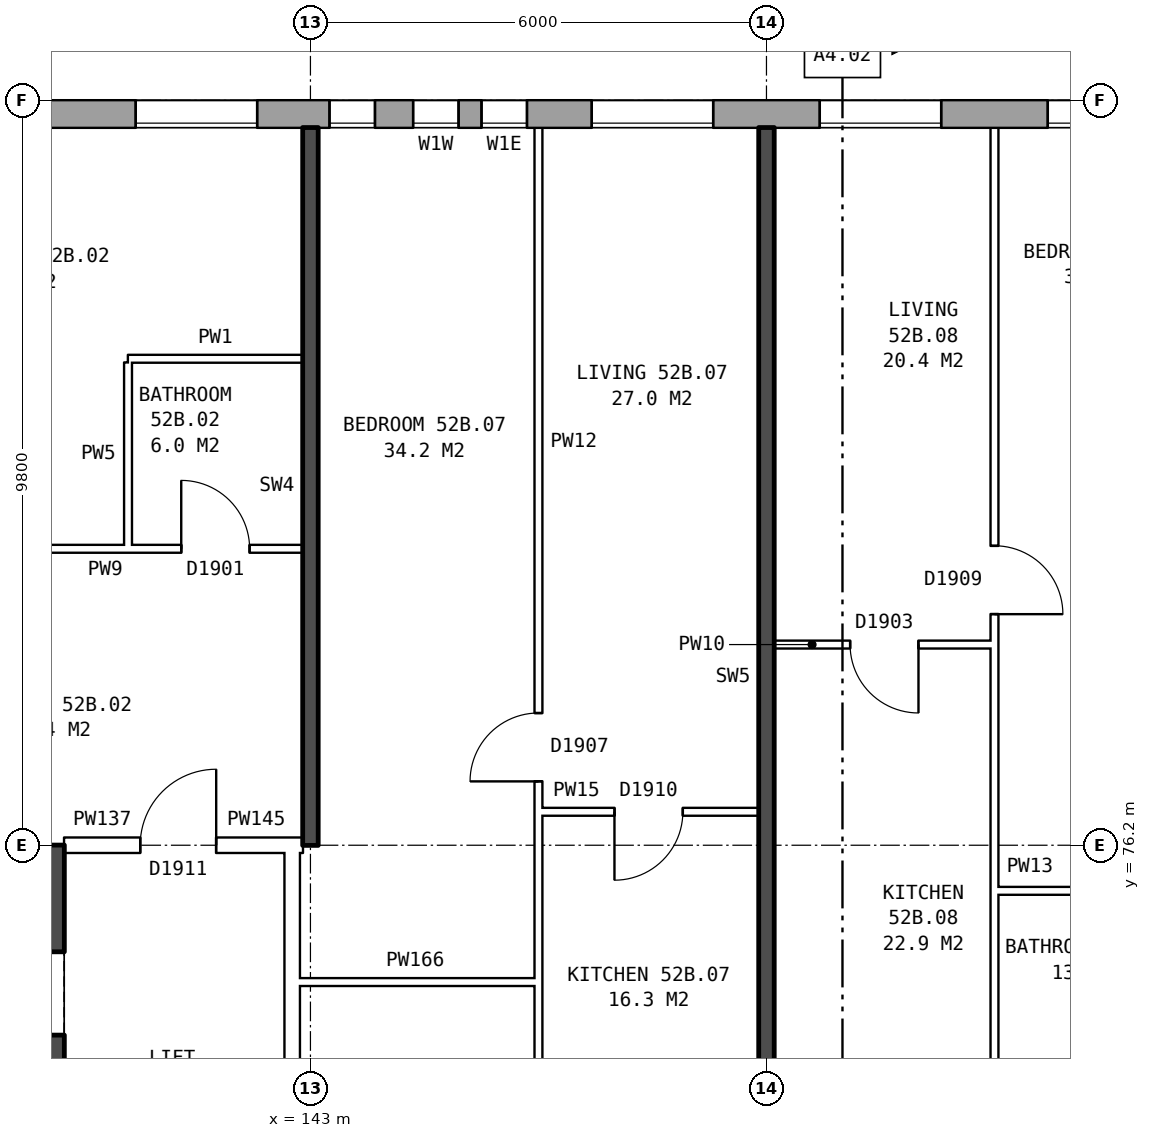
"""IFC4 building model, lengths in metres.
Left out: names, types, materials, properties, quantities, classifications, styles, units other than length and angle.
Written with IfcOpenShell. Run it as: python <this file> out.ifc"""

import sys

from ifc_helpers import new_model, si_unit, direction, frame, frame_2d, origin, place, context, subcontext, project, spatial, rectangle, extrude, element, fill, save


model = new_model("IFC4")
c1 = context("Model", 3, precision=1e-05, world=origin(), true_north=direction((0.0, 1.0)))
c2 = subcontext(c1, "Body", "Model", "MODEL_VIEW")
j1 = project(units=[si_unit("LENGTHUNIT", "METRE"), si_unit("PLANEANGLEUNIT", "RADIAN")], contexts=[c1])
p1 = place(None, origin())
s1 = spatial("IfcSite", under=j1, at=p1, CompositionType="ELEMENT")
p2 = place(p1, origin())
s2 = spatial("IfcBuilding", under=s1, at=p2, CompositionType="ELEMENT")
p3 = place(p2, frame((0.0, 0.0, 185.1)))
s3 = spatial("IfcBuildingStorey", under=s2, at=p3, CompositionType="ELEMENT", Elevation=185.1)
p4 = place(p3, frame((167.175, 85.82, 0.0), z_axis=(0.0, 0.0, 1.0), x_axis=(-1.0, 0.0, 0.0)))
e1 = element("IfcWall", 1, at=p4, inside=s3, PredefinedType="STANDARD", context=c2, shape_type="SweptSolid", body=[
    extrude(rectangle(XDim=33.101, YDim=0.36, at=frame_2d((16.55, 0.0))), origin(), (0.0, 0.0, 1.0), 2.85),
])
p5 = place(p4, frame((0.875, 0.0, 0.8)))
e2 = element("IfcOpeningElement", 2, at=p5, cuts=e1, PredefinedType="OPENING", context=c2, shape_type="SweptSolid", body=[
    extrude(rectangle(XDim=1.6, YDim=1.8, at=frame_2d((0.8, 0.9))), frame((0.0, 0.19, 0.0), z_axis=(0.0, -1.0, 0.0), x_axis=(1.0, 0.0, 0.0)), (0.0, 0.0, 1.0), 0.38),
])
p6 = place(p4, frame((3.875, 0.0, 0.8)))
e3 = element("IfcOpeningElement", 3, at=p6, cuts=e1, PredefinedType="OPENING", context=c2, shape_type="SweptSolid", body=[
    extrude(rectangle(XDim=1.6, YDim=1.8, at=frame_2d((0.8, 0.9))), frame((0.0, 0.19, 0.0), z_axis=(0.0, -1.0, 0.0), x_axis=(1.0, 0.0, 0.0)), (0.0, 0.0, 1.0), 0.38),
])
p7 = place(p4, frame((6.875, 0.0, 0.8)))
e4 = element("IfcOpeningElement", 4, at=p7, cuts=e1, PredefinedType="OPENING", context=c2, shape_type="SweptSolid", body=[
    extrude(rectangle(XDim=1.6, YDim=1.8, at=frame_2d((0.8, 0.9))), frame((0.0, 0.19, 0.0), z_axis=(0.0, -1.0, 0.0), x_axis=(1.0, 0.0, 0.0)), (0.0, 0.0, 1.0), 0.38),
])
p8 = place(p4, frame((8.775, 0.0, 1.4)))
e5 = element("IfcOpeningElement", 5, at=p8, cuts=e1, PredefinedType="OPENING", context=c2, shape_type="SweptSolid", body=[
    extrude(rectangle(XDim=0.8, YDim=1.2, at=frame_2d((0.4, 0.6))), frame((0.0, 0.19, 0.0), z_axis=(0.0, -1.0, 0.0), x_axis=(1.0, 0.0, 0.0)), (0.0, 0.0, 1.0), 0.38),
])
p9 = place(p4, frame((12.875, 0.0, 0.8)))
e6 = element("IfcOpeningElement", 6, at=p9, cuts=e1, PredefinedType="OPENING", context=c2, shape_type="SweptSolid", body=[
    extrude(rectangle(XDim=1.6, YDim=1.8, at=frame_2d((0.8, 0.9))), frame((0.0, 0.19, 0.0), z_axis=(0.0, -1.0, 0.0), x_axis=(1.0, 0.0, 0.0)), (0.0, 0.0, 1.0), 0.38),
])
p10 = place(p4, frame((15.875, 0.0, 0.8)))
e7 = element("IfcOpeningElement", 7, at=p10, cuts=e1, PredefinedType="OPENING", context=c2, shape_type="SweptSolid", body=[
    extrude(rectangle(XDim=1.6, YDim=1.8, at=frame_2d((0.8, 0.9))), frame((0.0, 0.19, 0.0), z_axis=(0.0, -1.0, 0.0), x_axis=(1.0, 0.0, 0.0)), (0.0, 0.0, 1.0), 0.38),
])
p11 = place(p4, frame((18.875, 0.0, 0.8)))
e8 = element("IfcOpeningElement", 8, at=p11, cuts=e1, PredefinedType="OPENING", context=c2, shape_type="SweptSolid", body=[
    extrude(rectangle(XDim=1.6, YDim=1.8, at=frame_2d((0.8, 0.9))), frame((0.0, 0.19, 0.0), z_axis=(0.0, -1.0, 0.0), x_axis=(1.0, 0.0, 0.0)), (0.0, 0.0, 1.0), 0.38),
])
p12 = place(p4, frame((21.325, 0.0, 0.25)))
e9 = element("IfcOpeningElement", 9, at=p12, cuts=e1, PredefinedType="OPENING", context=c2, shape_type="SweptSolid", body=[
    extrude(rectangle(XDim=0.6, YDim=1.8, at=frame_2d((0.3, 0.9))), frame((0.0, 0.19, 0.0), z_axis=(0.0, -1.0, 0.0), x_axis=(1.0, 0.0, 0.0)), (0.0, 0.0, 1.0), 0.38),
])
p13 = place(p4, frame((24.875, 0.0, 0.8)))
e10 = element("IfcOpeningElement", 10, at=p13, cuts=e1, PredefinedType="OPENING", context=c2, shape_type="SweptSolid", body=[
    extrude(rectangle(XDim=1.6, YDim=1.8, at=frame_2d((0.8, 0.9))), frame((0.0, 0.19, 0.0), z_axis=(0.0, -1.0, 0.0), x_axis=(1.0, 0.0, 0.0)), (0.0, 0.0, 1.0), 0.38),
])
p14 = place(p4, frame((27.875, 0.0, 0.8)))
e11 = element("IfcOpeningElement", 11, at=p14, cuts=e1, PredefinedType="OPENING", context=c2, shape_type="SweptSolid", body=[
    extrude(rectangle(XDim=1.6, YDim=1.8, at=frame_2d((0.8, 0.9))), frame((0.0, 0.19, 0.0), z_axis=(0.0, -1.0, 0.0), x_axis=(1.0, 0.0, 0.0)), (0.0, 0.0, 1.0), 0.38),
])
p15 = place(p4, frame((30.875, 0.0, 0.8)))
e12 = element("IfcOpeningElement", 12, at=p15, cuts=e1, PredefinedType="OPENING", context=c2, shape_type="SweptSolid", body=[
    extrude(rectangle(XDim=1.6, YDim=1.8, at=frame_2d((0.8, 0.9))), frame((0.0, 0.19, 0.0), z_axis=(0.0, -1.0, 0.0), x_axis=(1.0, 0.0, 0.0)), (0.0, 0.0, 1.0), 0.38),
])
p16 = place(p4, frame((11.125, 0.0, 0.8)))
e13 = element("IfcOpeningElement", 13, at=p16, cuts=e1, PredefinedType="OPENING", context=c2, shape_type="SweptSolid", body=[
    extrude(rectangle(XDim=0.8, YDim=1.2, at=frame_2d((0.4, 0.6))), frame((0.0, 0.19, 0.0), z_axis=(0.0, -1.0, 0.0), x_axis=(1.0, 0.0, 0.0)), (0.0, 0.0, 1.0), 0.38),
])
p17 = place(p4, frame((22.225, 0.0, 0.15)))
e14 = element("IfcOpeningElement", 14, at=p17, cuts=e1, PredefinedType="OPENING", context=c2, shape_type="SweptSolid", body=[
    extrude(rectangle(XDim=0.6, YDim=0.9, at=frame_2d((0.3, 0.45))), frame((0.0, 0.19, 0.0), z_axis=(0.0, -1.0, 0.0), x_axis=(1.0, 0.0, 0.0)), (0.0, 0.0, 1.0), 0.38),
])
p18 = place(p4, frame((23.325, 0.0, 1.65)))
e15 = element("IfcOpeningElement", 15, at=p18, cuts=e1, PredefinedType="OPENING", context=c2, shape_type="SweptSolid", body=[
    extrude(rectangle(XDim=0.6, YDim=0.9, at=frame_2d((0.3, 0.45))), frame((0.0, 0.19, 0.0), z_axis=(0.0, -1.0, 0.0), x_axis=(1.0, 0.0, 0.0)), (0.0, 0.0, 1.0), 0.38),
])
p19 = place(p3, frame((139.535, 63.8, 0.0), z_axis=(0.0, 0.0, 1.0), x_axis=(0.0, 1.0, 0.0)))
e16 = element("IfcWall", 16, at=p19, inside=s3, PredefinedType="SHEAR", context=c2, shape_type="SweptSolid", body=[
    extrude(rectangle(XDim=12.4, YDim=0.45, at=frame_2d((6.2, 0.0))), origin(), (0.0, 0.0, 1.0), 2.85),
])
p20 = place(p19, frame((1.325, 0.0, 0.0)))
e17 = element("IfcOpeningElement", 17, at=p20, cuts=e16, PredefinedType="OPENING", context=c2, shape_type="SweptSolid", body=[
    extrude(rectangle(XDim=1.1, YDim=2.1, at=frame_2d((0.55, 1.05))), frame((0.0, 0.235, 0.0), z_axis=(0.0, -1.0, 0.0), x_axis=(1.0, 0.0, 0.0)), (0.0, 0.0, 1.0), 0.47),
])
p21 = place(p19, frame((3.6, 0.0, 0.0)))
e18 = element("IfcOpeningElement", 18, at=p21, cuts=e16, PredefinedType="OPENING", context=c2, shape_type="SweptSolid", body=[
    extrude(rectangle(XDim=1.1, YDim=2.1, at=frame_2d((0.55, 1.05))), frame((0.0, 0.235, 0.0), z_axis=(0.0, -1.0, 0.0), x_axis=(1.0, 0.0, 0.0)), (0.0, 0.0, 1.0), 0.47),
])
p22 = place(p19, frame((5.8, 0.0, 0.0)))
e19 = element("IfcOpeningElement", 19, at=p22, cuts=e16, PredefinedType="OPENING", context=c2, shape_type="SweptSolid", body=[
    extrude(rectangle(XDim=1.1, YDim=2.1, at=frame_2d((0.55, 1.05))), frame((0.0, 0.235, 0.0), z_axis=(0.0, -1.0, 0.0), x_axis=(1.0, 0.0, 0.0)), (0.0, 0.0, 1.0), 0.47),
])
p23 = place(p19, frame((9.9, 0.0, 0.0)))
e20 = element("IfcOpeningElement", 20, at=p23, cuts=e16, PredefinedType="OPENING", context=c2, shape_type="SweptSolid", body=[
    extrude(rectangle(XDim=1.1, YDim=2.1, at=frame_2d((0.55, 1.05))), frame((0.0, 0.235, 0.0), z_axis=(0.0, -1.0, 0.0), x_axis=(1.0, 0.0, 0.0)), (0.0, 0.0, 1.0), 0.47),
])
p24 = place(p19, frame((8.125, 0.0, 0.0)))
e21 = element("IfcOpeningElement", 21, at=p24, cuts=e16, PredefinedType="OPENING", context=c2, shape_type="SweptSolid", body=[
    extrude(rectangle(XDim=0.85, YDim=2.1, at=frame_2d((0.425, 1.05))), frame((0.0, 0.235, 0.0), z_axis=(0.0, -1.0, 0.0), x_axis=(1.0, 0.0, 0.0)), (0.0, 0.0, 1.0), 0.47),
])
p25 = place(p3, frame((142.76, 63.9, 0.0), z_axis=(0.0, 0.0, 1.0), x_axis=(0.0, 1.0, 0.0)))
e22 = element("IfcWall", 22, at=p25, inside=s3, PredefinedType="PARTITIONING", context=c2, shape_type="SweptSolid", body=[
    extrude(rectangle(XDim=12.2, YDim=0.2, at=frame_2d((6.1, 0.0))), origin(), (0.0, 0.0, 1.0), 2.85),
])
p26 = place(p25, frame((5.1, 0.0, 0.0)))
e23 = element("IfcOpeningElement", 23, at=p26, cuts=e22, PredefinedType="OPENING", context=c2, shape_type="SweptSolid", body=[
    extrude(rectangle(XDim=2.0, YDim=2.1, at=frame_2d((1.0, 1.05))), frame((0.0, 0.11, 0.0), z_axis=(0.0, -1.0, 0.0), x_axis=(1.0, 0.0, 0.0)), (0.0, 0.0, 1.0), 0.22),
])
p27 = place(p3, frame((142.76, 74.4, 0.0), z_axis=(0.0, 0.0, 1.0), x_axis=(1.0, 0.0, 0.0)))
e24 = element("IfcWall", 24, at=p27, inside=s3, PredefinedType="PARTITIONING", context=c2, shape_type="SweptSolid", body=[
    extrude(rectangle(XDim=3.24, YDim=0.1, at=frame_2d((1.62, 0.0))), origin(), (0.0, 0.0, 1.0), 2.85),
])
p28 = place(p3, frame((152.0, 75.6, 0.0), z_axis=(0.0, 0.0, 1.0), x_axis=(1.0, 0.0, 0.0)))
e25 = element("IfcWall", 25, at=p28, inside=s3, PredefinedType="PARTITIONING", context=c2, shape_type="SweptSolid", body=[
    extrude(rectangle(XDim=2.9, YDim=0.1, at=frame_2d((1.45, 0.0))), origin(), (0.0, 0.0, 1.0), 2.85),
])
p29 = place(p3, frame((139.76, 76.2, 0.0), z_axis=(0.0, 0.0, 1.0), x_axis=(1.0, 0.0, 0.0)))
e26 = element("IfcWall", 26, at=p29, inside=s3, PredefinedType="PARTITIONING", context=c2, shape_type="SweptSolid", body=[
    extrude(rectangle(XDim=3.0, YDim=0.2, at=frame_2d((1.5, 0.0))), origin(), (0.0, 0.0, 1.0), 2.85),
])
p30 = place(p29, frame((1.0, 0.0, 0.0)))
e27 = element("IfcOpeningElement", 27, at=p30, cuts=e26, PredefinedType="OPENING", context=c2, shape_type="SweptSolid", body=[
    extrude(rectangle(XDim=1.0, YDim=2.1, at=frame_2d((0.5, 1.05))), frame((0.0, 0.11, 0.0), z_axis=(0.0, -1.0, 0.0), x_axis=(1.0, 0.0, 0.0)), (0.0, 0.0, 1.0), 0.22),
])
p31 = place(p3, frame((142.76, 76.2, 0.0), z_axis=(0.0, 0.0, 1.0), x_axis=(1.0, 0.0, 0.0)))
e28 = element("IfcWall", 28, at=p31, inside=s3, PredefinedType="PARTITIONING", context=c2, shape_type="SweptSolid", body=[
    extrude(rectangle(XDim=0.14, YDim=0.2, at=frame_2d((0.07, 0.0))), origin(), (0.0, 0.0, 1.0), 2.85),
])
p32 = place(p3, frame((146.0, 76.64, 0.0), z_axis=(0.0, 0.0, 1.0), x_axis=(1.0, 0.0, 0.0)))
e29 = element("IfcWall", 29, at=p32, inside=s3, PredefinedType="PARTITIONING", context=c2, shape_type="SweptSolid", body=[
    extrude(rectangle(XDim=2.9, YDim=0.1, at=frame_2d((1.45, 0.0))), origin(), (0.0, 0.0, 1.0), 2.85),
])
p33 = place(p32, frame((1.0, 0.0, 0.0)))
e30 = element("IfcOpeningElement", 30, at=p33, cuts=e29, PredefinedType="OPENING", context=c2, shape_type="SweptSolid", body=[
    extrude(rectangle(XDim=0.9, YDim=2.1, at=frame_2d((0.45, 1.05))), frame((0.0, 0.06, 0.0), z_axis=(0.0, -1.0, 0.0), x_axis=(1.0, 0.0, 0.0)), (0.0, 0.0, 1.0), 0.12),
])
p34 = place(p3, frame((149.1, 78.84, 0.0), z_axis=(0.0, 0.0, 1.0), x_axis=(1.0, 0.0, 0.0)))
e31 = element("IfcWall", 31, at=p34, inside=s3, PredefinedType="PARTITIONING", context=c2, shape_type="SweptSolid", body=[
    extrude(rectangle(XDim=2.9, YDim=0.1, at=frame_2d((1.45, 0.0))), origin(), (0.0, 0.0, 1.0), 2.85),
])
p35 = place(p34, frame((1.0, 0.0, 0.0)))
e32 = element("IfcOpeningElement", 32, at=p35, cuts=e31, PredefinedType="OPENING", context=c2, shape_type="SweptSolid", body=[
    extrude(rectangle(XDim=0.9, YDim=2.1, at=frame_2d((0.45, 1.05))), frame((0.0, 0.06, 0.0), z_axis=(0.0, -1.0, 0.0), x_axis=(1.0, 0.0, 0.0)), (0.0, 0.0, 1.0), 0.12),
])
p36 = place(p3, frame((137.1, 80.1, 0.0), z_axis=(0.0, 0.0, 1.0), x_axis=(1.0, 0.0, 0.0)))
e33 = element("IfcWall", 33, at=p36, inside=s3, PredefinedType="PARTITIONING", context=c2, shape_type="SweptSolid", body=[
    extrude(rectangle(XDim=5.8, YDim=0.1, at=frame_2d((2.9, 0.0))), origin(), (0.0, 0.0, 1.0), 2.85),
])
p37 = place(p36, frame((1.3, 0.0, 0.0)))
e34 = element("IfcOpeningElement", 34, at=p37, cuts=e33, PredefinedType="OPENING", context=c2, shape_type="SweptSolid", body=[
    extrude(rectangle(XDim=0.9, YDim=2.1, at=frame_2d((0.45, 1.05))), frame((0.0, 0.06, 0.0), z_axis=(0.0, -1.0, 0.0), x_axis=(1.0, 0.0, 0.0)), (0.0, 0.0, 1.0), 0.12),
])
p38 = place(p36, frame((4.2, 0.0, 0.0)))
e35 = element("IfcOpeningElement", 35, at=p38, cuts=e33, PredefinedType="OPENING", context=c2, shape_type="SweptSolid", body=[
    extrude(rectangle(XDim=0.9, YDim=2.1, at=frame_2d((0.45, 1.05))), frame((0.0, 0.06, 0.0), z_axis=(0.0, -1.0, 0.0), x_axis=(1.0, 0.0, 0.0)), (0.0, 0.0, 1.0), 0.12),
])
p39 = place(p3, frame((140.6, 82.6, 0.0), z_axis=(0.0, 0.0, 1.0), x_axis=(1.0, 0.0, 0.0)))
e36 = element("IfcWall", 36, at=p39, inside=s3, PredefinedType="PARTITIONING", context=c2, shape_type="SweptSolid", body=[
    extrude(rectangle(XDim=2.3, YDim=0.1, at=frame_2d((1.15, 0.0))), origin(), (0.0, 0.0, 1.0), 2.85),
])
p40 = place(p3, frame((140.6, 80.15, 0.0), z_axis=(0.0, 0.0, 1.0), x_axis=(0.0, 1.0, 0.0)))
e37 = element("IfcWall", 37, at=p40, inside=s3, PredefinedType="PARTITIONING", context=c2, shape_type="SweptSolid", body=[
    extrude(rectangle(XDim=2.4, YDim=0.1, at=frame_2d((1.2, 0.0))), origin(), (0.0, 0.0, 1.0), 2.85),
])
p41 = place(p3, frame((143.0, 76.2, 0.0), z_axis=(0.0, 0.0, 1.0), x_axis=(0.0, 1.0, 0.0)))
e38 = element("IfcWall", 38, at=p41, inside=s3, PredefinedType="SOLIDWALL", context=c2, shape_type="SweptSolid", body=[
    extrude(rectangle(XDim=9.44, YDim=0.2, at=frame_2d((4.72, 0.0))), origin(), (0.0, 0.0, 1.0), 2.85),
])
p42 = place(p3, frame((146.0, 71.3, 0.0), z_axis=(0.0, 0.0, 1.0), x_axis=(0.0, 1.0, 0.0)))
e39 = element("IfcWall", 39, at=p42, inside=s3, PredefinedType="PARTITIONING", context=c2, shape_type="SweptSolid", body=[
    extrude(rectangle(XDim=14.34, YDim=0.1, at=frame_2d((7.17, 0.0))), origin(), (0.0, 0.0, 1.0), 2.85),
])
p43 = place(p42, frame((5.74, 0.0, 0.0)))
e40 = element("IfcOpeningElement", 40, at=p43, cuts=e39, PredefinedType="OPENING", context=c2, shape_type="SweptSolid", body=[
    extrude(rectangle(XDim=0.9, YDim=2.1, at=frame_2d((0.45, 1.05))), frame((0.0, 0.06, 0.0), z_axis=(0.0, -1.0, 0.0), x_axis=(1.0, 0.0, 0.0)), (0.0, 0.0, 1.0), 0.12),
])
p44 = place(p42, frame((0.4, 0.0, 0.0)))
e41 = element("IfcOpeningElement", 41, at=p44, cuts=e39, PredefinedType="OPENING", context=c2, shape_type="SweptSolid", body=[
    extrude(rectangle(XDim=0.9, YDim=2.1, at=frame_2d((0.45, 1.05))), frame((0.0, 0.06, 0.0), z_axis=(0.0, -1.0, 0.0), x_axis=(1.0, 0.0, 0.0)), (0.0, 0.0, 1.0), 0.12),
])
p45 = place(p3, frame((149.0, 71.2, 0.0), z_axis=(0.0, 0.0, 1.0), x_axis=(0.0, 1.0, 0.0)))
e42 = element("IfcWall", 42, at=p45, inside=s3, PredefinedType="SOLIDWALL", context=c2, shape_type="SweptSolid", body=[
    extrude(rectangle(XDim=14.44, YDim=0.2, at=frame_2d((7.22, 0.0))), origin(), (0.0, 0.0, 1.0), 2.85),
])
p46 = place(p3, frame((152.0, 71.3, 0.0), z_axis=(0.0, 0.0, 1.0), x_axis=(0.0, 1.0, 0.0)))
e43 = element("IfcWall", 43, at=p46, inside=s3, PredefinedType="PARTITIONING", context=c2, shape_type="SweptSolid", body=[
    extrude(rectangle(XDim=14.34, YDim=0.1, at=frame_2d((7.17, 0.0))), origin(), (0.0, 0.0, 1.0), 2.85),
])
p47 = place(p46, frame((7.94, 0.0, 0.0)))
e44 = element("IfcOpeningElement", 44, at=p47, cuts=e43, PredefinedType="OPENING", context=c2, shape_type="SweptSolid", body=[
    extrude(rectangle(XDim=0.9, YDim=2.1, at=frame_2d((0.45, 1.05))), frame((0.0, 0.06, 0.0), z_axis=(0.0, -1.0, 0.0), x_axis=(1.0, 0.0, 0.0)), (0.0, 0.0, 1.0), 0.12),
])
p48 = place(p46, frame((0.4, 0.0, 0.0)))
e45 = element("IfcOpeningElement", 45, at=p48, cuts=e43, PredefinedType="OPENING", context=c2, shape_type="SweptSolid", body=[
    extrude(rectangle(XDim=0.9, YDim=2.1, at=frame_2d((0.45, 1.05))), frame((0.0, 0.06, 0.0), z_axis=(0.0, -1.0, 0.0), x_axis=(1.0, 0.0, 0.0)), (0.0, 0.0, 1.0), 0.12),
])
p49 = place(p9, origin())
e46 = element("IfcWindow", 46, at=p49, inside=s3, PartitioningType="SINGLE_PANEL", PredefinedType="WINDOW", context=c2, shape_type="SweptSolid", body=[
    extrude(rectangle(XDim=1.6, YDim=1.8, at=frame_2d((0.8, 0.9))), frame((0.0, 0.15, 0.0), z_axis=(0.0, -1.0, 0.0), x_axis=(1.0, 0.0, 0.0)), (0.0, 0.0, 1.0), 0.06),
])
fill(e6, e46)
p50 = place(p10, origin())
e47 = element("IfcWindow", 47, at=p50, inside=s3, PartitioningType="SINGLE_PANEL", PredefinedType="WINDOW", context=c2, shape_type="SweptSolid", body=[
    extrude(rectangle(XDim=1.6, YDim=1.8, at=frame_2d((0.8, 0.9))), frame((0.0, 0.15, 0.0), z_axis=(0.0, -1.0, 0.0), x_axis=(1.0, 0.0, 0.0)), (0.0, 0.0, 1.0), 0.06),
])
fill(e7, e47)
p51 = place(p11, origin())
e48 = element("IfcWindow", 48, at=p51, inside=s3, PartitioningType="SINGLE_PANEL", PredefinedType="WINDOW", context=c2, shape_type="SweptSolid", body=[
    extrude(rectangle(XDim=1.6, YDim=1.8, at=frame_2d((0.8, 0.9))), frame((0.0, 0.15, 0.0), z_axis=(0.0, -1.0, 0.0), x_axis=(1.0, 0.0, 0.0)), (0.0, 0.0, 1.0), 0.06),
])
fill(e8, e48)
p52 = place(p12, origin())
e49 = element("IfcWindow", 49, at=p52, inside=s3, PartitioningType="SINGLE_PANEL", PredefinedType="WINDOW", context=c2, shape_type="SweptSolid", body=[
    extrude(rectangle(XDim=0.6, YDim=1.8, at=frame_2d((0.3, 0.9))), frame((0.0, 0.15, 0.0), z_axis=(0.0, -1.0, 0.0), x_axis=(1.0, 0.0, 0.0)), (0.0, 0.0, 1.0), 0.06),
])
fill(e9, e49)
p53 = place(p13, origin())
e50 = element("IfcWindow", 50, at=p53, inside=s3, PartitioningType="SINGLE_PANEL", PredefinedType="WINDOW", context=c2, shape_type="SweptSolid", body=[
    extrude(rectangle(XDim=1.6, YDim=1.8, at=frame_2d((0.8, 0.9))), frame((0.0, 0.15, 0.0), z_axis=(0.0, -1.0, 0.0), x_axis=(1.0, 0.0, 0.0)), (0.0, 0.0, 1.0), 0.06),
])
fill(e10, e50)
p54 = place(p30, origin())
e51 = element("IfcDoor", 51, at=p54, inside=s3, OperationType="SINGLE_SWING_RIGHT", PredefinedType="DOOR", context=c2, shape_type="SweptSolid", body=[
    extrude(rectangle(XDim=1.0, YDim=2.1, at=frame_2d((0.5, 1.05))), frame((0.0, 0.025, 0.0), z_axis=(0.0, -1.0, 0.0), x_axis=(1.0, 0.0, 0.0)), (0.0, 0.0, 1.0), 0.05),
])
fill(e27, e51)
p55 = place(p38, origin())
e52 = element("IfcDoor", 52, at=p55, inside=s3, OperationType="SINGLE_SWING_LEFT", PredefinedType="DOOR", context=c2, shape_type="SweptSolid", body=[
    extrude(rectangle(XDim=0.9, YDim=2.1, at=frame_2d((0.45, 1.05))), frame((0.0, 0.025, 0.0), z_axis=(0.0, -1.0, 0.0), x_axis=(1.0, 0.0, 0.0)), (0.0, 0.0, 1.0), 0.05),
])
fill(e35, e52)
p56 = place(p43, origin())
e53 = element("IfcDoor", 53, at=p56, inside=s3, OperationType="SINGLE_SWING_LEFT", PredefinedType="DOOR", context=c2, shape_type="SweptSolid", body=[
    extrude(rectangle(XDim=0.9, YDim=2.1, at=frame_2d((0.45, 1.05))), frame((0.0, 0.025, 0.0), z_axis=(0.0, -1.0, 0.0), x_axis=(1.0, 0.0, 0.0)), (0.0, 0.0, 1.0), 0.05),
])
fill(e40, e53)
p57 = place(p33, frame((0.9, 0.0, 0.0), z_axis=(0.0, 0.0, 1.0), x_axis=(-1.0, 0.0, 0.0)))
e54 = element("IfcDoor", 54, at=p57, inside=s3, OperationType="SINGLE_SWING_RIGHT", PredefinedType="DOOR", context=c2, shape_type="SweptSolid", body=[
    extrude(rectangle(XDim=0.9, YDim=2.1, at=frame_2d((0.45, 1.05))), frame((0.0, 0.025, 0.0), z_axis=(0.0, -1.0, 0.0), x_axis=(1.0, 0.0, 0.0)), (0.0, 0.0, 1.0), 0.05),
])
fill(e30, e54)
p58 = place(p47, frame((0.9, 0.0, 0.0), z_axis=(0.0, 0.0, 1.0), x_axis=(-1.0, 0.0, 0.0)))
e55 = element("IfcDoor", 55, at=p58, inside=s3, OperationType="SINGLE_SWING_RIGHT", PredefinedType="DOOR", context=c2, shape_type="SweptSolid", body=[
    extrude(rectangle(XDim=0.9, YDim=2.1, at=frame_2d((0.45, 1.05))), frame((0.0, 0.025, 0.0), z_axis=(0.0, -1.0, 0.0), x_axis=(1.0, 0.0, 0.0)), (0.0, 0.0, 1.0), 0.05),
])
fill(e44, e55)
p59 = place(p35, frame((0.9, 0.0, 0.0), z_axis=(0.0, 0.0, 1.0), x_axis=(-1.0, 0.0, 0.0)))
e56 = element("IfcDoor", 56, at=p59, inside=s3, OperationType="SINGLE_SWING_LEFT", PredefinedType="DOOR", context=c2, shape_type="SweptSolid", body=[
    extrude(rectangle(XDim=0.9, YDim=2.1, at=frame_2d((0.45, 1.05))), frame((0.0, 0.025, 0.0), z_axis=(0.0, -1.0, 0.0), x_axis=(1.0, 0.0, 0.0)), (0.0, 0.0, 1.0), 0.05),
])
fill(e32, e56)
p60 = place(p17, origin())
e57 = element("IfcWindow", 57, at=p60, inside=s3, PartitioningType="SINGLE_PANEL", PredefinedType="WINDOW", context=c2, shape_type="SweptSolid", body=[
    extrude(rectangle(XDim=0.6, YDim=0.9, at=frame_2d((0.3, 0.45))), frame((0.0, 0.15, 0.0), z_axis=(0.0, -1.0, 0.0), x_axis=(1.0, 0.0, 0.0)), (0.0, 0.0, 1.0), 0.06),
])
fill(e14, e57)
p61 = place(p18, origin())
e58 = element("IfcWindow", 58, at=p61, inside=s3, PartitioningType="SINGLE_PANEL", PredefinedType="WINDOW", context=c2, shape_type="SweptSolid", body=[
    extrude(rectangle(XDim=0.6, YDim=0.9, at=frame_2d((0.3, 0.45))), frame((0.0, 0.15, 0.0), z_axis=(0.0, -1.0, 0.0), x_axis=(1.0, 0.0, 0.0)), (0.0, 0.0, 1.0), 0.06),
])
fill(e15, e58)
save(model, sys.argv[1])
